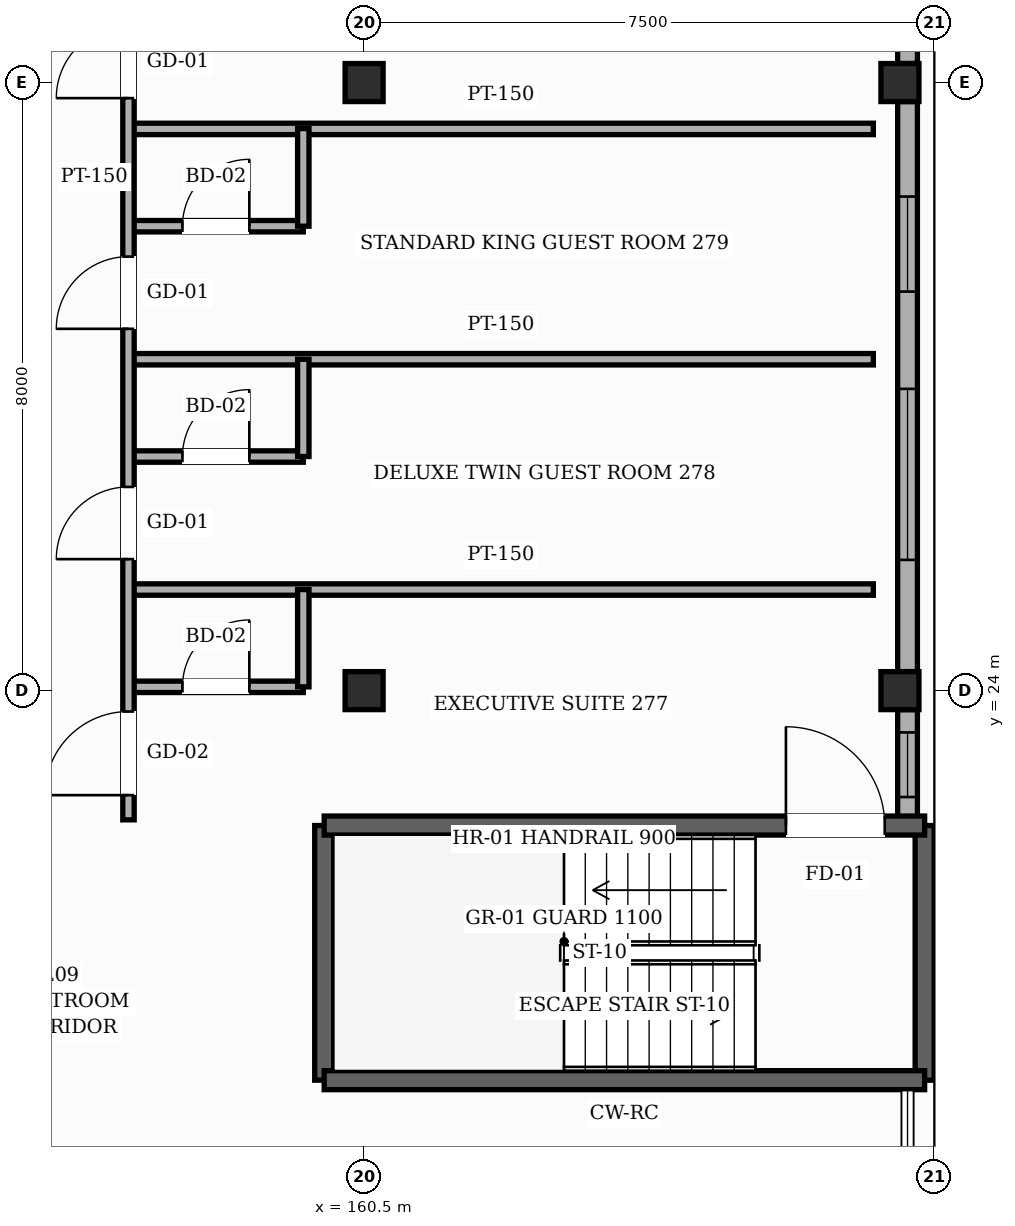
"""IFC4 building model, lengths in metres.
Left out: names, types, materials, properties, quantities, classifications, styles, units other than length and angle.
Written with IfcOpenShell. Run it as: python <this file> out.ifc"""

import sys

from ifc_helpers import new_model, si_unit, direction, frame, frame_2d, origin, origin_2d, place, context, subcontext, project, spatial, rectangle, hollow_rectangle, extrude, element, fill, save


model = new_model("IFC4")
c1 = context("Model", 3, precision=1e-05, world=origin(), true_north=direction((0.0, 1.0)))
c2 = subcontext(c1, "Body", "Model", "MODEL_VIEW")
j1 = project(units=[si_unit("LENGTHUNIT", "METRE"), si_unit("PLANEANGLEUNIT", "RADIAN")], contexts=[c1])
p1 = place(None, origin())
s1 = spatial("IfcSite", under=j1, at=p1, CompositionType="ELEMENT")
p2 = place(p1, origin())
s2 = spatial("IfcBuilding", under=s1, at=p2, CompositionType="ELEMENT")
p3 = place(p2, frame((0.0, 0.0, 39.0)))
s3 = spatial("IfcBuildingStorey", under=s2, at=p3, CompositionType="ELEMENT", Elevation=39.0)
for number, where, z_axis, x_axis in (
    (1, (160.5, 24.0, 0.0), (0.0, 0.0, 1.0), (1.0, 0.0, 0.0)),
    (2, (160.5, 32.0, 0.0), (0.0, 0.0, 1.0), (1.0, 0.0, 0.0)),
    (3, (167.55, 24.0, 0.0), (0.0, 0.0, 1.0), (1.0, 0.0, 0.0)),
    (4, (167.55, 32.0, 0.0), (0.0, 0.0, 1.0), (1.0, 0.0, 0.0)),
):
    element("IfcColumn", number, at=place(p3, frame(where, z_axis=z_axis, x_axis=x_axis)), inside=s3, PredefinedType="COLUMN", context=c2, shape_type="SweptSolid", body=[
        extrude(hollow_rectangle(XDim=0.5, YDim=0.5, WallThickness=0.022, InnerFilletRadius=0.022, OuterFilletRadius=0.044, at=origin_2d()), origin(), (0.0, 0.0, 1.0), 3.6),
    ])
p4 = place(p3, frame((167.65, 23.75, 0.0), z_axis=(0.0, 0.0, 1.0), x_axis=(0.0, -1.0, 0.0)))
e5 = element("IfcWall", 5, at=p4, inside=s3, PredefinedType="SOLIDWALL", context=c2, shape_type="SweptSolid", body=[
    extrude(rectangle(XDim=1.525, YDim=0.26, at=frame_2d((0.762, 0.0))), origin(), (0.0, 0.0, 1.0), 3.365),
])
p5 = place(p4, frame((0.3, 0.0, 0.85)))
e6 = element("IfcOpeningElement", 6, at=p5, cuts=e5, PredefinedType="OPENING", context=c2, shape_type="SweptSolid", body=[
    extrude(rectangle(XDim=0.85, YDim=1.35, at=frame_2d((0.425, 0.675))), frame((0.0, 0.14, 0.0), z_axis=(0.0, -1.0, 0.0), x_axis=(1.0, 0.0, 0.0)), (0.0, 0.0, 1.0), 0.28),
])
p6 = place(p3, frame((167.65, 31.75, 0.0), z_axis=(0.0, 0.0, 1.0), x_axis=(0.0, -1.0, 0.0)))
e7 = element("IfcWall", 7, at=p6, inside=s3, PredefinedType="SOLIDWALL", context=c2, shape_type="SweptSolid", body=[
    extrude(rectangle(XDim=7.5, YDim=0.26, at=frame_2d((3.75, 0.0))), origin(), (0.0, 0.0, 1.0), 2.755),
])
p7 = place(p6, frame((3.78, 0.0, 0.85)))
e8 = element("IfcOpeningElement", 8, at=p7, cuts=e7, PredefinedType="OPENING", context=c2, shape_type="SweptSolid", body=[
    extrude(rectangle(XDim=2.25, YDim=1.35, at=frame_2d((1.125, 0.675))), frame((0.0, 0.14, 0.0), z_axis=(0.0, -1.0, 0.0), x_axis=(1.0, 0.0, 0.0)), (0.0, 0.0, 1.0), 0.28),
])
p8 = place(p6, frame((1.25, 0.0, 0.85)))
e9 = element("IfcOpeningElement", 9, at=p8, cuts=e7, PredefinedType="OPENING", context=c2, shape_type="SweptSolid", body=[
    extrude(rectangle(XDim=1.25, YDim=1.35, at=frame_2d((0.625, 0.675))), frame((0.0, 0.14, 0.0), z_axis=(0.0, -1.0, 0.0), x_axis=(1.0, 0.0, 0.0)), (0.0, 0.0, 1.0), 0.28),
])
p9 = place(p3, frame((167.65, 40.65, 0.0), z_axis=(0.0, 0.0, 1.0), x_axis=(0.0, -1.0, 0.0)))
e10 = element("IfcWall", 10, at=p9, inside=s3, PredefinedType="SOLIDWALL", context=c2, shape_type="SweptSolid", body=[
    extrude(rectangle(XDim=8.4, YDim=0.26, at=frame_2d((4.2, 0.0))), origin(), (0.0, 0.0, 1.0), 2.755),
])
p10 = place(p9, frame((6.59, 0.0, 0.85)))
e11 = element("IfcOpeningElement", 11, at=p10, cuts=e10, PredefinedType="OPENING", context=c2, shape_type="SweptSolid", body=[
    extrude(rectangle(XDim=1.45, YDim=1.35, at=frame_2d((0.725, 0.675))), frame((0.0, 0.14, 0.0), z_axis=(0.0, -1.0, 0.0), x_axis=(1.0, 0.0, 0.0)), (0.0, 0.0, 1.0), 0.28),
])
p11 = place(p9, frame((3.885, 0.0, 0.85)))
e12 = element("IfcOpeningElement", 12, at=p11, cuts=e10, PredefinedType="OPENING", context=c2, shape_type="SweptSolid", body=[
    extrude(rectangle(XDim=1.65, YDim=1.35, at=frame_2d((0.825, 0.675))), frame((0.0, 0.14, 0.0), z_axis=(0.0, -1.0, 0.0), x_axis=(1.0, 0.0, 0.0)), (0.0, 0.0, 1.0), 0.28),
])
p12 = place(p9, frame((0.755, 0.0, 0.85)))
e13 = element("IfcOpeningElement", 13, at=p12, cuts=e10, PredefinedType="OPENING", context=c2, shape_type="SweptSolid", body=[
    extrude(rectangle(XDim=1.85, YDim=1.35, at=frame_2d((0.925, 0.675))), frame((0.0, 0.14, 0.0), z_axis=(0.0, -1.0, 0.0), x_axis=(1.0, 0.0, 0.0)), (0.0, 0.0, 1.0), 0.28),
])
for number, where, z_axis, x_axis in (
    (14, (167.875, 22.225, 0.0), (0.0, 0.0, 1.0), (0.0, -1.0, 0.0)),
    (15, (159.975, 18.875, 0.0), (0.0, 0.0, 1.0), (0.0, 1.0, 0.0)),
):
    element("IfcWall", number, at=place(p3, frame(where, z_axis=z_axis, x_axis=x_axis)), inside=s3, PredefinedType="SHEAR", context=c2, shape_type="SweptSolid", body=[
        extrude(rectangle(XDim=3.35, YDim=0.25, at=frame_2d((1.675, 0.0))), origin(), (0.0, 0.0, 1.0), 3.38),
    ])
p13 = place(p3, frame((159.975, 22.225, 0.0), z_axis=(0.0, 0.0, 1.0), x_axis=(1.0, 0.0, 0.0)))
e16 = element("IfcWall", 16, at=p13, inside=s3, PredefinedType="SHEAR", context=c2, shape_type="SweptSolid", body=[
    extrude(rectangle(XDim=7.9, YDim=0.25, at=frame_2d((3.95, 0.0))), origin(), (0.0, 0.0, 1.0), 3.38),
])
p14 = place(p13, frame((6.075, 0.0, 0.0)))
e17 = element("IfcOpeningElement", 17, at=p14, cuts=e16, PredefinedType="OPENING", context=c2, shape_type="SweptSolid", body=[
    extrude(rectangle(XDim=1.3, YDim=2.2, at=frame_2d((0.65, 1.1))), frame((0.0, 0.135, 0.0), z_axis=(0.0, -1.0, 0.0), x_axis=(1.0, 0.0, 0.0)), (0.0, 0.0, 1.0), 0.27),
])
p15 = place(p3, frame((167.875, 18.875, 0.0), z_axis=(0.0, 0.0, 1.0), x_axis=(-1.0, 0.0, 0.0)))
e18 = element("IfcWall", 18, at=p15, inside=s3, PredefinedType="SHEAR", context=c2, shape_type="SweptSolid", body=[
    extrude(rectangle(XDim=7.9, YDim=0.25, at=frame_2d((3.95, 0.0))), origin(), (0.0, 0.0, 1.0), 3.38),
])
p16 = place(p3, frame((157.4, 24.05, 0.0), z_axis=(0.0, 0.0, 1.0), x_axis=(1.0, 0.0, 0.0)))
e19 = element("IfcWall", 19, at=p16, inside=s3, PredefinedType="PARTITIONING", context=c2, shape_type="SweptSolid", body=[
    extrude(rectangle(XDim=2.3, YDim=0.15, at=frame_2d((1.15, 0.0))), origin(), (0.0, 0.0, 1.0), 2.755),
])
p17 = place(p16, frame((0.71, 0.0, 0.0)))
e20 = element("IfcOpeningElement", 20, at=p17, cuts=e19, PredefinedType="OPENING", context=c2, shape_type="SweptSolid", body=[
    extrude(rectangle(XDim=0.88, YDim=2.12, at=frame_2d((0.44, 1.06))), frame((0.0, 0.085, 0.0), z_axis=(0.0, -1.0, 0.0), x_axis=(1.0, 0.0, 0.0)), (0.0, 0.0, 1.0), 0.17),
])
p18 = place(p3, frame((157.4, 25.33, 0.0), z_axis=(0.0, 0.0, 1.0), x_axis=(1.0, 0.0, 0.0)))
e21 = element("IfcWall", 21, at=p18, inside=s3, PredefinedType="PARTITIONING", context=c2, shape_type="SweptSolid", body=[
    extrude(rectangle(XDim=9.8, YDim=0.15, at=frame_2d((4.9, 0.0))), origin(), (0.0, 0.0, 1.0), 3.365),
])
p19 = place(p3, frame((157.4, 27.08, 0.0), z_axis=(0.0, 0.0, 1.0), x_axis=(1.0, 0.0, 0.0)))
e22 = element("IfcWall", 22, at=p19, inside=s3, PredefinedType="PARTITIONING", context=c2, shape_type="SweptSolid", body=[
    extrude(rectangle(XDim=2.3, YDim=0.15, at=frame_2d((1.15, 0.0))), origin(), (0.0, 0.0, 1.0), 3.365),
])
p20 = place(p19, frame((0.71, 0.0, 0.0)))
e23 = element("IfcOpeningElement", 23, at=p20, cuts=e22, PredefinedType="OPENING", context=c2, shape_type="SweptSolid", body=[
    extrude(rectangle(XDim=0.88, YDim=2.12, at=frame_2d((0.44, 1.06))), frame((0.0, 0.085, 0.0), z_axis=(0.0, -1.0, 0.0), x_axis=(1.0, 0.0, 0.0)), (0.0, 0.0, 1.0), 0.17),
])
p21 = place(p3, frame((157.4, 28.36, 0.0), z_axis=(0.0, 0.0, 1.0), x_axis=(1.0, 0.0, 0.0)))
e24 = element("IfcWall", 24, at=p21, inside=s3, PredefinedType="PARTITIONING", context=c2, shape_type="SweptSolid", body=[
    extrude(rectangle(XDim=9.8, YDim=0.15, at=frame_2d((4.9, 0.0))), origin(), (0.0, 0.0, 1.0), 3.365),
])
p22 = place(p3, frame((157.4, 30.11, 0.0), z_axis=(0.0, 0.0, 1.0), x_axis=(1.0, 0.0, 0.0)))
e25 = element("IfcWall", 25, at=p22, inside=s3, PredefinedType="PARTITIONING", context=c2, shape_type="SweptSolid", body=[
    extrude(rectangle(XDim=2.3, YDim=0.15, at=frame_2d((1.15, 0.0))), origin(), (0.0, 0.0, 1.0), 3.365),
])
p23 = place(p22, frame((0.71, 0.0, 0.0)))
e26 = element("IfcOpeningElement", 26, at=p23, cuts=e25, PredefinedType="OPENING", context=c2, shape_type="SweptSolid", body=[
    extrude(rectangle(XDim=0.88, YDim=2.12, at=frame_2d((0.44, 1.06))), frame((0.0, 0.085, 0.0), z_axis=(0.0, -1.0, 0.0), x_axis=(1.0, 0.0, 0.0)), (0.0, 0.0, 1.0), 0.17),
])
p24 = place(p3, frame((157.4, 31.39, 0.0), z_axis=(0.0, 0.0, 1.0), x_axis=(1.0, 0.0, 0.0)))
e27 = element("IfcWall", 27, at=p24, inside=s3, PredefinedType="PARTITIONING", context=c2, shape_type="SweptSolid", body=[
    extrude(rectangle(XDim=9.8, YDim=0.15, at=frame_2d((4.9, 0.0))), origin(), (0.0, 0.0, 1.0), 3.365),
])
p25 = place(p3, frame((157.4, 22.3, 0.0), z_axis=(0.0, 0.0, 1.0), x_axis=(0.0, 1.0, 0.0)))
e28 = element("IfcWall", 28, at=p25, inside=s3, PredefinedType="PARTITIONING", context=c2, shape_type="SweptSolid", body=[
    extrude(rectangle(XDim=48.5, YDim=0.15, at=frame_2d((24.25, 0.0))), origin(), (0.0, 0.0, 1.0), 3.365),
])
p26 = place(p25, frame((0.325, 0.0, 0.0)))
e29 = element("IfcOpeningElement", 29, at=p26, cuts=e28, PredefinedType="OPENING", context=c2, shape_type="SweptSolid", body=[
    extrude(rectangle(XDim=1.1, YDim=2.2, at=frame_2d((0.55, 1.1))), frame((0.0, 0.085, 0.0), z_axis=(0.0, -1.0, 0.0), x_axis=(1.0, 0.0, 0.0)), (0.0, 0.0, 1.0), 0.17),
])
p27 = place(p25, frame((3.43, 0.0, 0.0)))
e30 = element("IfcOpeningElement", 30, at=p27, cuts=e28, PredefinedType="OPENING", context=c2, shape_type="SweptSolid", body=[
    extrude(rectangle(XDim=0.95, YDim=2.15, at=frame_2d((0.475, 1.075))), frame((0.0, 0.085, 0.0), z_axis=(0.0, -1.0, 0.0), x_axis=(1.0, 0.0, 0.0)), (0.0, 0.0, 1.0), 0.17),
])
p28 = place(p25, frame((6.46, 0.0, 0.0)))
e31 = element("IfcOpeningElement", 31, at=p28, cuts=e28, PredefinedType="OPENING", context=c2, shape_type="SweptSolid", body=[
    extrude(rectangle(XDim=0.95, YDim=2.15, at=frame_2d((0.475, 1.075))), frame((0.0, 0.085, 0.0), z_axis=(0.0, -1.0, 0.0), x_axis=(1.0, 0.0, 0.0)), (0.0, 0.0, 1.0), 0.17),
])
p29 = place(p25, frame((9.495, 0.0, 0.0)))
e32 = element("IfcOpeningElement", 32, at=p29, cuts=e28, PredefinedType="OPENING", context=c2, shape_type="SweptSolid", body=[
    extrude(rectangle(XDim=0.95, YDim=2.15, at=frame_2d((0.475, 1.075))), frame((0.0, 0.085, 0.0), z_axis=(0.0, -1.0, 0.0), x_axis=(1.0, 0.0, 0.0)), (0.0, 0.0, 1.0), 0.17),
])
p30 = place(p25, frame((12.525, 0.0, 0.0)))
e33 = element("IfcOpeningElement", 33, at=p30, cuts=e28, PredefinedType="OPENING", context=c2, shape_type="SweptSolid", body=[
    extrude(rectangle(XDim=0.95, YDim=2.15, at=frame_2d((0.475, 1.075))), frame((0.0, 0.085, 0.0), z_axis=(0.0, -1.0, 0.0), x_axis=(1.0, 0.0, 0.0)), (0.0, 0.0, 1.0), 0.17),
])
p31 = place(p25, frame((15.555, 0.0, 0.0)))
e34 = element("IfcOpeningElement", 34, at=p31, cuts=e28, PredefinedType="OPENING", context=c2, shape_type="SweptSolid", body=[
    extrude(rectangle(XDim=0.95, YDim=2.15, at=frame_2d((0.475, 1.075))), frame((0.0, 0.085, 0.0), z_axis=(0.0, -1.0, 0.0), x_axis=(1.0, 0.0, 0.0)), (0.0, 0.0, 1.0), 0.17),
])
p32 = place(p25, frame((18.585, 0.0, 0.0)))
e35 = element("IfcOpeningElement", 35, at=p32, cuts=e28, PredefinedType="OPENING", context=c2, shape_type="SweptSolid", body=[
    extrude(rectangle(XDim=0.95, YDim=2.15, at=frame_2d((0.475, 1.075))), frame((0.0, 0.085, 0.0), z_axis=(0.0, -1.0, 0.0), x_axis=(1.0, 0.0, 0.0)), (0.0, 0.0, 1.0), 0.17),
])
p33 = place(p25, frame((21.62, 0.0, 0.0)))
e36 = element("IfcOpeningElement", 36, at=p33, cuts=e28, PredefinedType="OPENING", context=c2, shape_type="SweptSolid", body=[
    extrude(rectangle(XDim=0.95, YDim=2.15, at=frame_2d((0.475, 1.075))), frame((0.0, 0.085, 0.0), z_axis=(0.0, -1.0, 0.0), x_axis=(1.0, 0.0, 0.0)), (0.0, 0.0, 1.0), 0.17),
])
p34 = place(p25, frame((24.65, 0.0, 0.0)))
e37 = element("IfcOpeningElement", 37, at=p34, cuts=e28, PredefinedType="OPENING", context=c2, shape_type="SweptSolid", body=[
    extrude(rectangle(XDim=0.95, YDim=2.15, at=frame_2d((0.475, 1.075))), frame((0.0, 0.085, 0.0), z_axis=(0.0, -1.0, 0.0), x_axis=(1.0, 0.0, 0.0)), (0.0, 0.0, 1.0), 0.17),
])
p35 = place(p25, frame((27.68, 0.0, 0.0)))
e38 = element("IfcOpeningElement", 38, at=p35, cuts=e28, PredefinedType="OPENING", context=c2, shape_type="SweptSolid", body=[
    extrude(rectangle(XDim=0.95, YDim=2.15, at=frame_2d((0.475, 1.075))), frame((0.0, 0.085, 0.0), z_axis=(0.0, -1.0, 0.0), x_axis=(1.0, 0.0, 0.0)), (0.0, 0.0, 1.0), 0.17),
])
p36 = place(p25, frame((30.71, 0.0, 0.0)))
e39 = element("IfcOpeningElement", 39, at=p36, cuts=e28, PredefinedType="OPENING", context=c2, shape_type="SweptSolid", body=[
    extrude(rectangle(XDim=0.95, YDim=2.15, at=frame_2d((0.475, 1.075))), frame((0.0, 0.085, 0.0), z_axis=(0.0, -1.0, 0.0), x_axis=(1.0, 0.0, 0.0)), (0.0, 0.0, 1.0), 0.17),
])
p37 = place(p25, frame((33.745, 0.0, 0.0)))
e40 = element("IfcOpeningElement", 40, at=p37, cuts=e28, PredefinedType="OPENING", context=c2, shape_type="SweptSolid", body=[
    extrude(rectangle(XDim=0.95, YDim=2.15, at=frame_2d((0.475, 1.075))), frame((0.0, 0.085, 0.0), z_axis=(0.0, -1.0, 0.0), x_axis=(1.0, 0.0, 0.0)), (0.0, 0.0, 1.0), 0.17),
])
p38 = place(p25, frame((36.775, 0.0, 0.0)))
e41 = element("IfcOpeningElement", 41, at=p38, cuts=e28, PredefinedType="OPENING", context=c2, shape_type="SweptSolid", body=[
    extrude(rectangle(XDim=0.95, YDim=2.15, at=frame_2d((0.475, 1.075))), frame((0.0, 0.085, 0.0), z_axis=(0.0, -1.0, 0.0), x_axis=(1.0, 0.0, 0.0)), (0.0, 0.0, 1.0), 0.17),
])
p39 = place(p25, frame((39.805, 0.0, 0.0)))
e42 = element("IfcOpeningElement", 42, at=p39, cuts=e28, PredefinedType="OPENING", context=c2, shape_type="SweptSolid", body=[
    extrude(rectangle(XDim=0.95, YDim=2.15, at=frame_2d((0.475, 1.075))), frame((0.0, 0.085, 0.0), z_axis=(0.0, -1.0, 0.0), x_axis=(1.0, 0.0, 0.0)), (0.0, 0.0, 1.0), 0.17),
])
p40 = place(p25, frame((42.84, 0.0, 0.0)))
e43 = element("IfcOpeningElement", 43, at=p40, cuts=e28, PredefinedType="OPENING", context=c2, shape_type="SweptSolid", body=[
    extrude(rectangle(XDim=0.95, YDim=2.15, at=frame_2d((0.475, 1.075))), frame((0.0, 0.085, 0.0), z_axis=(0.0, -1.0, 0.0), x_axis=(1.0, 0.0, 0.0)), (0.0, 0.0, 1.0), 0.17),
])
p41 = place(p25, frame((45.87, 0.0, 0.0)))
e44 = element("IfcOpeningElement", 44, at=p41, cuts=e28, PredefinedType="OPENING", context=c2, shape_type="SweptSolid", body=[
    extrude(rectangle(XDim=0.95, YDim=2.15, at=frame_2d((0.475, 1.075))), frame((0.0, 0.085, 0.0), z_axis=(0.0, -1.0, 0.0), x_axis=(1.0, 0.0, 0.0)), (0.0, 0.0, 1.0), 0.17),
])
for number, where, z_axis, x_axis in (
    (45, (159.7, 24.05, 0.0), (0.0, 0.0, 1.0), (0.0, 1.0, 0.0)),
    (46, (159.7, 27.08, 0.0), (0.0, 0.0, 1.0), (0.0, 1.0, 0.0)),
):
    element("IfcWall", number, at=place(p3, frame(where, z_axis=z_axis, x_axis=x_axis)), inside=s3, PredefinedType="PARTITIONING", context=c2, shape_type="SweptSolid", body=[
        extrude(rectangle(XDim=1.28, YDim=0.15, at=frame_2d((0.64, 0.0))), origin(), (0.0, 0.0, 1.0), 3.365),
    ])
p42 = place(p3, frame((159.7, 30.11, 0.0), z_axis=(0.0, 0.0, 1.0), x_axis=(0.0, 1.0, 0.0)))
e47 = element("IfcWall", 47, at=p42, inside=s3, PredefinedType="PARTITIONING", context=c2, shape_type="SweptSolid", body=[
    extrude(rectangle(XDim=1.285, YDim=0.15, at=frame_2d((0.643, 0.0))), origin(), (0.0, 0.0, 1.0), 3.365),
])
p43 = place(p5, origin())
e48 = element("IfcWindow", 48, at=p43, inside=s3, PartitioningType="SINGLE_PANEL", PredefinedType="WINDOW", context=c2, shape_type="SweptSolid", body=[
    extrude(rectangle(XDim=0.85, YDim=1.35, at=frame_2d((0.425, 0.675))), frame((0.0, 0.03, 0.0), z_axis=(0.0, -1.0, 0.0), x_axis=(1.0, 0.0, 0.0)), (0.0, 0.0, 1.0), 0.06),
])
fill(e6, e48)
p44 = place(p7, origin())
e49 = element("IfcWindow", 49, at=p44, inside=s3, PartitioningType="SINGLE_PANEL", PredefinedType="WINDOW", context=c2, shape_type="SweptSolid", body=[
    extrude(rectangle(XDim=2.25, YDim=1.35, at=frame_2d((1.125, 0.675))), frame((0.0, 0.03, 0.0), z_axis=(0.0, -1.0, 0.0), x_axis=(1.0, 0.0, 0.0)), (0.0, 0.0, 1.0), 0.06),
])
fill(e8, e49)
p45 = place(p8, origin())
e50 = element("IfcWindow", 50, at=p45, inside=s3, PartitioningType="SINGLE_PANEL", PredefinedType="WINDOW", context=c2, shape_type="SweptSolid", body=[
    extrude(rectangle(XDim=1.25, YDim=1.35, at=frame_2d((0.625, 0.675))), frame((0.0, 0.03, 0.0), z_axis=(0.0, -1.0, 0.0), x_axis=(1.0, 0.0, 0.0)), (0.0, 0.0, 1.0), 0.06),
])
fill(e9, e50)
p46 = place(p14, origin())
e51 = element("IfcDoor", 51, at=p46, inside=s3, OperationType="SINGLE_SWING_LEFT", PredefinedType="DOOR", context=c2, shape_type="SweptSolid", body=[
    extrude(rectangle(XDim=1.3, YDim=2.2, at=frame_2d((0.65, 1.1))), frame((0.0, 0.025, 0.0), z_axis=(0.0, -1.0, 0.0), x_axis=(1.0, 0.0, 0.0)), (0.0, 0.0, 1.0), 0.05),
])
fill(e17, e51)
p47 = place(p26, origin())
e52 = element("IfcDoor", 52, at=p47, inside=s3, OperationType="SINGLE_SWING_LEFT", PredefinedType="DOOR", context=c2, shape_type="SweptSolid", body=[
    extrude(rectangle(XDim=1.1, YDim=2.2, at=frame_2d((0.55, 1.1))), frame((0.0, 0.025, 0.0), z_axis=(0.0, -1.0, 0.0), x_axis=(1.0, 0.0, 0.0)), (0.0, 0.0, 1.0), 0.05),
])
fill(e29, e52)
p48 = place(p17, origin())
e53 = element("IfcDoor", 53, at=p48, inside=s3, OperationType="SINGLE_SWING_RIGHT", PredefinedType="DOOR", context=c2, shape_type="SweptSolid", body=[
    extrude(rectangle(XDim=0.88, YDim=2.12, at=frame_2d((0.44, 1.06))), frame((0.0, 0.025, 0.0), z_axis=(0.0, -1.0, 0.0), x_axis=(1.0, 0.0, 0.0)), (0.0, 0.0, 1.0), 0.05),
])
fill(e20, e53)
p49 = place(p27, origin())
e54 = element("IfcDoor", 54, at=p49, inside=s3, OperationType="SINGLE_SWING_LEFT", PredefinedType="DOOR", context=c2, shape_type="SweptSolid", body=[
    extrude(rectangle(XDim=0.95, YDim=2.15, at=frame_2d((0.475, 1.075))), frame((0.0, 0.025, 0.0), z_axis=(0.0, -1.0, 0.0), x_axis=(1.0, 0.0, 0.0)), (0.0, 0.0, 1.0), 0.05),
])
fill(e30, e54)
p50 = place(p20, origin())
e55 = element("IfcDoor", 55, at=p50, inside=s3, OperationType="SINGLE_SWING_RIGHT", PredefinedType="DOOR", context=c2, shape_type="SweptSolid", body=[
    extrude(rectangle(XDim=0.88, YDim=2.12, at=frame_2d((0.44, 1.06))), frame((0.0, 0.025, 0.0), z_axis=(0.0, -1.0, 0.0), x_axis=(1.0, 0.0, 0.0)), (0.0, 0.0, 1.0), 0.05),
])
fill(e23, e55)
p51 = place(p28, origin())
e56 = element("IfcDoor", 56, at=p51, inside=s3, OperationType="SINGLE_SWING_LEFT", PredefinedType="DOOR", context=c2, shape_type="SweptSolid", body=[
    extrude(rectangle(XDim=0.95, YDim=2.15, at=frame_2d((0.475, 1.075))), frame((0.0, 0.025, 0.0), z_axis=(0.0, -1.0, 0.0), x_axis=(1.0, 0.0, 0.0)), (0.0, 0.0, 1.0), 0.05),
])
fill(e31, e56)
p52 = place(p23, origin())
e57 = element("IfcDoor", 57, at=p52, inside=s3, OperationType="SINGLE_SWING_RIGHT", PredefinedType="DOOR", context=c2, shape_type="SweptSolid", body=[
    extrude(rectangle(XDim=0.88, YDim=2.12, at=frame_2d((0.44, 1.06))), frame((0.0, 0.025, 0.0), z_axis=(0.0, -1.0, 0.0), x_axis=(1.0, 0.0, 0.0)), (0.0, 0.0, 1.0), 0.05),
])
fill(e26, e57)
p53 = place(p29, origin())
e58 = element("IfcDoor", 58, at=p53, inside=s3, OperationType="SINGLE_SWING_LEFT", PredefinedType="DOOR", context=c2, shape_type="SweptSolid", body=[
    extrude(rectangle(XDim=0.95, YDim=2.15, at=frame_2d((0.475, 1.075))), frame((0.0, 0.025, 0.0), z_axis=(0.0, -1.0, 0.0), x_axis=(1.0, 0.0, 0.0)), (0.0, 0.0, 1.0), 0.05),
])
fill(e32, e58)
save(model, sys.argv[1])
